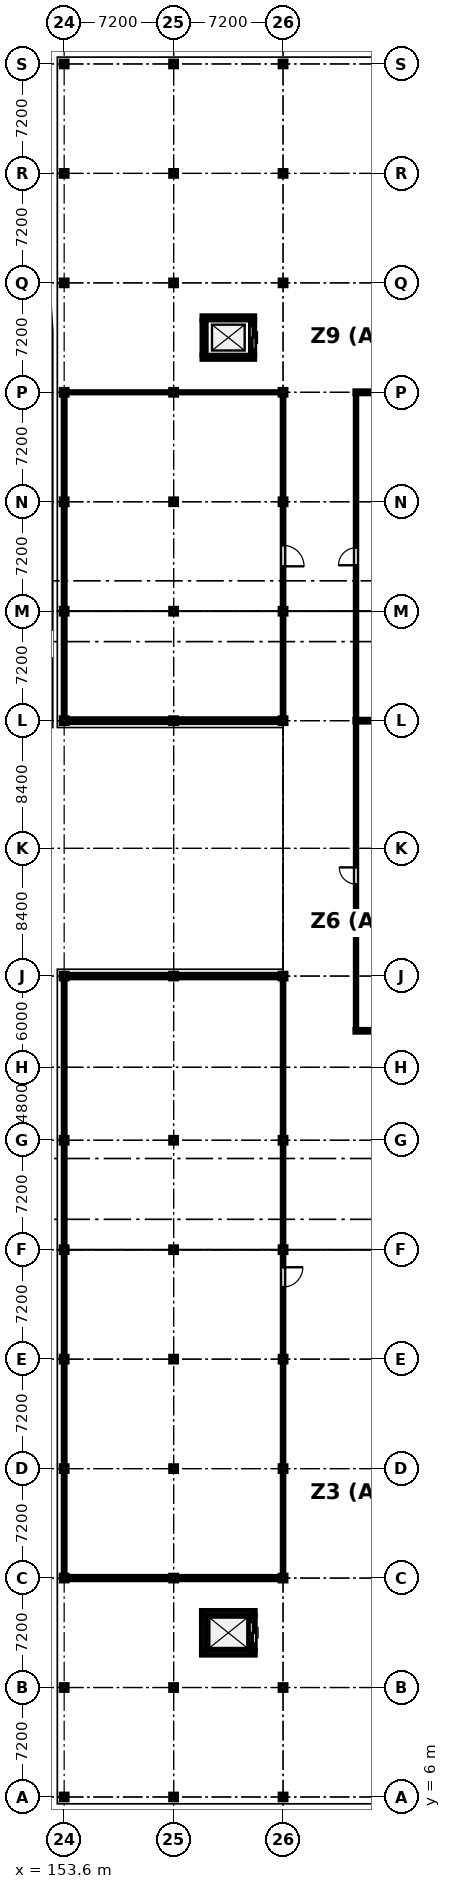
"""IFC4 building model, lengths in metres.
Left out: names, types, materials, properties, quantities, classifications, styles, units other than length and angle.
Written with IfcOpenShell. Run it as: python <this file> out.ifc"""

import sys

from ifc_helpers import new_model, si_unit, direction, frame, frame_2d, origin, origin_2d, place, context, subcontext, project, spatial, rectangle, i_section, extrude, element, fill, save


model = new_model("IFC4")
c1 = context("Model", 3, precision=1e-05, world=origin(), true_north=direction((0.0, 1.0)))
c2 = subcontext(c1, "Body", "Model", "MODEL_VIEW")
j1 = project(units=[si_unit("LENGTHUNIT", "METRE"), si_unit("PLANEANGLEUNIT", "RADIAN")], contexts=[c1])
p1 = place(None, origin())
s1 = spatial("IfcSite", under=j1, at=p1, CompositionType="ELEMENT")
p2 = place(p1, origin())
s2 = spatial("IfcBuilding", under=s1, at=p2, CompositionType="ELEMENT")
p3 = place(p2, frame((0.0, 0.0, -4.5)))
s3 = spatial("IfcBuildingStorey", under=s2, at=p3, CompositionType="ELEMENT", Elevation=-4.5)
for number, where, z_axis, x_axis in (
    (1, (153.6, 6.0, 0.0), (0.0, 0.0, 1.0), (1.0, 0.0, 0.0)),
    (2, (153.6, 13.2, 0.0), (0.0, 0.0, 1.0), (1.0, 0.0, 0.0)),
    (3, (153.6, 20.4, 0.0), (0.0, 0.0, 1.0), (1.0, 0.0, 0.0)),
    (4, (153.6, 27.6, 0.0), (0.0, 0.0, 1.0), (1.0, 0.0, 0.0)),
    (5, (153.6, 34.8, 0.0), (0.0, 0.0, 1.0), (1.0, 0.0, 0.0)),
    (6, (153.6, 42.0, 0.0), (0.0, 0.0, 1.0), (1.0, 0.0, 0.0)),
    (7, (153.6, 49.2, 0.0), (0.0, 0.0, 1.0), (1.0, 0.0, 0.0)),
    (8, (153.6, 60.0, 0.0), (0.0, 0.0, 1.0), (1.0, 0.0, 0.0)),
    (9, (153.6, 76.8, 0.0), (0.0, 0.0, 1.0), (1.0, 0.0, 0.0)),
    (10, (153.6, 84.0, 0.0), (0.0, 0.0, 1.0), (1.0, 0.0, 0.0)),
    (11, (153.6, 91.2, 0.0), (0.0, 0.0, 1.0), (1.0, 0.0, 0.0)),
    (12, (153.6, 98.4, 0.0), (0.0, 0.0, 1.0), (1.0, 0.0, 0.0)),
    (13, (153.6, 105.6, 0.0), (0.0, 0.0, 1.0), (1.0, 0.0, 0.0)),
    (14, (153.6, 112.8, 0.0), (0.0, 0.0, 1.0), (1.0, 0.0, 0.0)),
    (15, (153.6, 120.0, 0.0), (0.0, 0.0, 1.0), (1.0, 0.0, 0.0)),
    (16, (160.8, 6.0, 0.0), (0.0, 0.0, 1.0), (1.0, 0.0, 0.0)),
    (17, (160.8, 13.2, 0.0), (0.0, 0.0, 1.0), (1.0, 0.0, 0.0)),
    (18, (160.8, 20.4, 0.0), (0.0, 0.0, 1.0), (1.0, 0.0, 0.0)),
    (19, (160.8, 27.6, 0.0), (0.0, 0.0, 1.0), (1.0, 0.0, 0.0)),
    (20, (160.8, 34.8, 0.0), (0.0, 0.0, 1.0), (1.0, 0.0, 0.0)),
    (21, (160.8, 42.0, 0.0), (0.0, 0.0, 1.0), (1.0, 0.0, 0.0)),
    (22, (160.8, 49.2, 0.0), (0.0, 0.0, 1.0), (1.0, 0.0, 0.0)),
    (23, (160.8, 60.0, 0.0), (0.0, 0.0, 1.0), (1.0, 0.0, 0.0)),
    (24, (160.8, 76.8, 0.0), (0.0, 0.0, 1.0), (1.0, 0.0, 0.0)),
    (25, (160.8, 84.0, 0.0), (0.0, 0.0, 1.0), (1.0, 0.0, 0.0)),
    (26, (160.8, 91.2, 0.0), (0.0, 0.0, 1.0), (1.0, 0.0, 0.0)),
    (27, (160.8, 98.4, 0.0), (0.0, 0.0, 1.0), (1.0, 0.0, 0.0)),
    (28, (160.8, 105.6, 0.0), (0.0, 0.0, 1.0), (1.0, 0.0, 0.0)),
    (29, (160.8, 112.8, 0.0), (0.0, 0.0, 1.0), (1.0, 0.0, 0.0)),
    (30, (160.8, 120.0, 0.0), (0.0, 0.0, 1.0), (1.0, 0.0, 0.0)),
    (31, (168.0, 6.0, 0.0), (0.0, 0.0, 1.0), (1.0, 0.0, 0.0)),
    (32, (168.0, 13.2, 0.0), (0.0, 0.0, 1.0), (1.0, 0.0, 0.0)),
    (33, (168.0, 20.4, 0.0), (0.0, 0.0, 1.0), (1.0, 0.0, 0.0)),
    (34, (168.0, 27.6, 0.0), (0.0, 0.0, 1.0), (1.0, 0.0, 0.0)),
    (35, (168.0, 34.8, 0.0), (0.0, 0.0, 1.0), (1.0, 0.0, 0.0)),
    (36, (168.0, 42.0, 0.0), (0.0, 0.0, 1.0), (1.0, 0.0, 0.0)),
    (37, (168.0, 49.2, 0.0), (0.0, 0.0, 1.0), (1.0, 0.0, 0.0)),
    (38, (168.0, 60.0, 0.0), (0.0, 0.0, 1.0), (1.0, 0.0, 0.0)),
    (39, (168.0, 76.8, 0.0), (0.0, 0.0, 1.0), (1.0, 0.0, 0.0)),
    (40, (168.0, 84.0, 0.0), (0.0, 0.0, 1.0), (1.0, 0.0, 0.0)),
    (41, (168.0, 91.2, 0.0), (0.0, 0.0, 1.0), (1.0, 0.0, 0.0)),
    (42, (168.0, 98.4, 0.0), (0.0, 0.0, 1.0), (1.0, 0.0, 0.0)),
    (43, (168.0, 105.6, 0.0), (0.0, 0.0, 1.0), (1.0, 0.0, 0.0)),
    (44, (168.0, 112.8, 0.0), (0.0, 0.0, 1.0), (1.0, 0.0, 0.0)),
    (45, (168.0, 120.0, 0.0), (0.0, 0.0, 1.0), (1.0, 0.0, 0.0)),
):
    element("IfcColumn", number, at=place(p3, frame(where, z_axis=z_axis, x_axis=x_axis)), inside=s3, PredefinedType="COLUMN", context=c2, shape_type="SweptSolid", body=[
        extrude(i_section(OverallWidth=0.399, OverallDepth=0.394, WebThickness=0.023, FlangeThickness=0.037, FilletRadius=0.015, at=origin_2d()), origin(), (0.0, 0.0, 1.0), 4.5),
    ])
for number, where, z_axis, x_axis in (
    (46, (166.175, 15.488, 0.0), (0.0, 0.0, 1.0), (-1.0, 0.0, 0.0)),
    (47, (162.625, 18.112, 0.0), (0.0, 0.0, 1.0), (1.0, 0.0, 0.0)),
):
    element("IfcWall", number, at=place(p3, frame(where, z_axis=z_axis, x_axis=x_axis)), inside=s3, PredefinedType="SHEAR", context=c2, shape_type="SweptSolid", body=[
        extrude(rectangle(XDim=3.55, YDim=0.325, at=frame_2d((1.775, 0.0))), origin(), (0.0, 0.0, 1.0), 4.18),
    ])
p4 = place(p3, frame((162.788, 15.65, 0.0), z_axis=(0.0, 0.0, 1.0), x_axis=(0.0, 1.0, 0.0)))
e48 = element("IfcWall", 48, at=p4, inside=s3, PredefinedType="SHEAR", context=c2, shape_type="SweptSolid", body=[
    extrude(rectangle(XDim=2.3, YDim=0.325, at=frame_2d((1.15, 0.0))), origin(), (0.0, 0.0, 1.0), 4.18),
])
p5 = place(p3, frame((166.012, 17.95, 0.0), z_axis=(0.0, 0.0, 1.0), x_axis=(0.0, -1.0, 0.0)))
e49 = element("IfcWall", 49, at=p5, inside=s3, PredefinedType="SHEAR", context=c2, shape_type="SweptSolid", body=[
    extrude(rectangle(XDim=2.3, YDim=0.325, at=frame_2d((1.15, 0.0))), origin(), (0.0, 0.0, 1.0), 4.18),
])
p6 = place(p5, frame((0.45, 0.0, 0.0)))
e50 = element("IfcOpeningElement", 50, at=p6, cuts=e49, PredefinedType="OPENING", context=c2, shape_type="SweptSolid", body=[
    extrude(rectangle(XDim=1.4, YDim=2.3, at=frame_2d((0.7, 1.15))), frame((0.0, 0.172, 0.0), z_axis=(0.0, -1.0, 0.0), x_axis=(1.0, 0.0, 0.0)), (0.0, 0.0, 1.0), 0.345),
])
for number, where, z_axis, x_axis in (
    (51, (166.14, 100.705, 0.0), (0.0, 0.0, 1.0), (-1.0, 0.0, 0.0)),
    (52, (162.66, 103.295, 0.0), (0.0, 0.0, 1.0), (1.0, 0.0, 0.0)),
):
    element("IfcWall", number, at=place(p3, frame(where, z_axis=z_axis, x_axis=x_axis)), inside=s3, PredefinedType="SHEAR", context=c2, shape_type="SweptSolid", body=[
        extrude(rectangle(XDim=3.48, YDim=0.29, at=frame_2d((1.74, 0.0))), origin(), (0.0, 0.0, 1.0), 4.18),
    ])
p7 = place(p3, frame((162.805, 100.85, 0.0), z_axis=(0.0, 0.0, 1.0), x_axis=(0.0, 1.0, 0.0)))
e53 = element("IfcWall", 53, at=p7, inside=s3, PredefinedType="SHEAR", context=c2, shape_type="SweptSolid", body=[
    extrude(rectangle(XDim=2.3, YDim=0.29, at=frame_2d((1.15, 0.0))), origin(), (0.0, 0.0, 1.0), 4.18),
])
p8 = place(p3, frame((165.995, 103.15, 0.0), z_axis=(0.0, 0.0, 1.0), x_axis=(0.0, -1.0, 0.0)))
e54 = element("IfcWall", 54, at=p8, inside=s3, PredefinedType="SHEAR", context=c2, shape_type="SweptSolid", body=[
    extrude(rectangle(XDim=2.3, YDim=0.29, at=frame_2d((1.15, 0.0))), origin(), (0.0, 0.0, 1.0), 4.18),
])
p9 = place(p8, frame((0.4, 0.0, 0.0)))
e55 = element("IfcOpeningElement", 55, at=p9, cuts=e54, PredefinedType="OPENING", context=c2, shape_type="SweptSolid", body=[
    extrude(rectangle(XDim=1.5, YDim=2.3, at=frame_2d((0.75, 1.15))), frame((0.0, 0.155, 0.0), z_axis=(0.0, -1.0, 0.0), x_axis=(1.0, 0.0, 0.0)), (0.0, 0.0, 1.0), 0.31),
])
p10 = place(p3, frame((203.868, 56.4, 0.0), z_axis=(0.0, 0.0, 1.0), x_axis=(-1.0, 0.0, 0.0)))
e56 = element("IfcWall", 56, at=p10, inside=s3, PredefinedType="PARTITIONING", context=c2, shape_type="SweptSolid", body=[
    extrude(rectangle(XDim=31.148, YDim=0.198, at=frame_2d((15.574, 0.0))), origin(), (0.0, 0.0, 1.0), 3.403),
])
p11 = place(p3, frame((172.72, 76.8, 0.0), z_axis=(0.0, 0.0, 1.0), x_axis=(1.0, 0.0, 0.0)))
e57 = element("IfcWall", 57, at=p11, inside=s3, PredefinedType="PARTITIONING", context=c2, shape_type="SweptSolid", body=[
    extrude(rectangle(XDim=31.148, YDim=0.205, at=frame_2d((15.574, 0.0))), origin(), (0.0, 0.0, 1.0), 3.403),
])
p12 = place(p3, frame((172.72, 98.4, 0.0), z_axis=(0.0, 0.0, 1.0), x_axis=(1.0, 0.0, 0.0)))
e58 = element("IfcWall", 58, at=p12, inside=s3, PredefinedType="PARTITIONING", context=c2, shape_type="SweptSolid", body=[
    extrude(rectangle(XDim=31.148, YDim=0.212, at=frame_2d((15.574, 0.0))), origin(), (0.0, 0.0, 1.0), 3.403),
])
p13 = place(p3, frame((168.08, 20.4, 0.0), z_axis=(0.0, 0.0, 1.0), x_axis=(-1.0, 0.0, 0.0)))
e59 = element("IfcWall", 59, at=p13, inside=s3, PredefinedType="PARTITIONING", context=c2, shape_type="SweptSolid", body=[
    extrude(rectangle(XDim=14.56, YDim=0.235, at=frame_2d((7.28, 0.0))), origin(), (0.0, 0.0, 1.0), 3.403),
])
p14 = place(p3, frame((153.52, 60.0, 0.0), z_axis=(0.0, 0.0, 1.0), x_axis=(1.0, 0.0, 0.0)))
e60 = element("IfcWall", 60, at=p14, inside=s3, PredefinedType="PARTITIONING", context=c2, shape_type="SweptSolid", body=[
    extrude(rectangle(XDim=14.56, YDim=0.25, at=frame_2d((7.28, 0.0))), origin(), (0.0, 0.0, 1.0), 3.403),
])
p15 = place(p3, frame((168.08, 76.8, 0.0), z_axis=(0.0, 0.0, 1.0), x_axis=(-1.0, 0.0, 0.0)))
e61 = element("IfcWall", 61, at=p15, inside=s3, PredefinedType="PARTITIONING", context=c2, shape_type="SweptSolid", body=[
    extrude(rectangle(XDim=14.56, YDim=0.27, at=frame_2d((7.28, 0.0))), origin(), (0.0, 0.0, 1.0), 3.403),
])
p16 = place(p3, frame((153.52, 98.4, 0.0), z_axis=(0.0, 0.0, 1.0), x_axis=(1.0, 0.0, 0.0)))
e62 = element("IfcWall", 62, at=p16, inside=s3, PredefinedType="PARTITIONING", context=c2, shape_type="SweptSolid", body=[
    extrude(rectangle(XDim=14.56, YDim=0.095, at=frame_2d((7.28, 0.0))), origin(), (0.0, 0.0, 1.0), 3.403),
])
p17 = place(p3, frame((172.8, 56.501, 0.0), z_axis=(0.0, 0.0, 1.0), x_axis=(0.0, 1.0, 0.0)))
e63 = element("IfcWall", 63, at=p17, inside=s3, PredefinedType="PARTITIONING", context=c2, shape_type="SweptSolid", body=[
    extrude(rectangle(XDim=20.195, YDim=0.105, at=frame_2d((10.098, 0.0))), origin(), (0.0, 0.0, 1.0), 3.403),
])
p18 = place(p17, frame((9.548, 0.0, 0.0)))
e64 = element("IfcOpeningElement", 64, at=p18, cuts=e63, PredefinedType="OPENING", context=c2, shape_type="SweptSolid", body=[
    extrude(rectangle(XDim=1.1, YDim=2.1, at=frame_2d((0.55, 1.05))), frame((0.0, 0.062, 0.0), z_axis=(0.0, -1.0, 0.0), x_axis=(1.0, 0.0, 0.0)), (0.0, 0.0, 1.0), 0.125),
])
p19 = place(p3, frame((172.8, 76.904, 0.0), z_axis=(0.0, 0.0, 1.0), x_axis=(0.0, 1.0, 0.0)))
e65 = element("IfcWall", 65, at=p19, inside=s3, PredefinedType="PARTITIONING", context=c2, shape_type="SweptSolid", body=[
    extrude(rectangle(XDim=21.388, YDim=0.11, at=frame_2d((10.694, 0.0))), origin(), (0.0, 0.0, 1.0), 3.403),
])
p20 = place(p19, frame((10.119, 0.0, 0.0)))
e66 = element("IfcOpeningElement", 66, at=p20, cuts=e65, PredefinedType="OPENING", context=c2, shape_type="SweptSolid", body=[
    extrude(rectangle(XDim=1.15, YDim=2.1, at=frame_2d((0.575, 1.05))), frame((0.0, 0.065, 0.0), z_axis=(0.0, -1.0, 0.0), x_axis=(1.0, 0.0, 0.0)), (0.0, 0.0, 1.0), 0.13),
])
p21 = place(p3, frame((168.0, 59.873, 0.0), z_axis=(0.0, 0.0, 1.0), x_axis=(0.0, -1.0, 0.0)))
e67 = element("IfcWall", 67, at=p21, inside=s3, PredefinedType="PARTITIONING", context=c2, shape_type="SweptSolid", body=[
    extrude(rectangle(XDim=39.354, YDim=0.12, at=frame_2d((19.677, 0.0))), origin(), (0.0, 0.0, 1.0), 3.403),
])
p22 = place(p21, frame((19.027, 0.0, 0.0)))
e68 = element("IfcOpeningElement", 68, at=p22, cuts=e67, PredefinedType="OPENING", context=c2, shape_type="SweptSolid", body=[
    extrude(rectangle(XDim=1.3, YDim=2.1, at=frame_2d((0.65, 1.05))), frame((0.0, 0.07, 0.0), z_axis=(0.0, -1.0, 0.0), x_axis=(1.0, 0.0, 0.0)), (0.0, 0.0, 1.0), 0.14),
])
p23 = place(p3, frame((168.0, 98.351, 0.0), z_axis=(0.0, 0.0, 1.0), x_axis=(0.0, -1.0, 0.0)))
e69 = element("IfcWall", 69, at=p23, inside=s3, PredefinedType="PARTITIONING", context=c2, shape_type="SweptSolid", body=[
    extrude(rectangle(XDim=21.414, YDim=0.125, at=frame_2d((10.707, 0.0))), origin(), (0.0, 0.0, 1.0), 3.403),
])
p24 = place(p23, frame((10.017, 0.0, 0.0)))
e70 = element("IfcOpeningElement", 70, at=p24, cuts=e69, PredefinedType="OPENING", context=c2, shape_type="SweptSolid", body=[
    extrude(rectangle(XDim=1.38, YDim=2.1, at=frame_2d((0.69, 1.05))), frame((0.0, 0.073, 0.0), z_axis=(0.0, -1.0, 0.0), x_axis=(1.0, 0.0, 0.0)), (0.0, 0.0, 1.0), 0.145),
])
p25 = place(p3, frame((153.6, 20.519, 0.0), z_axis=(0.0, 0.0, 1.0), x_axis=(0.0, 1.0, 0.0)))
e71 = element("IfcWall", 71, at=p25, inside=s3, PredefinedType="PARTITIONING", context=c2, shape_type="SweptSolid", body=[
    extrude(rectangle(XDim=39.354, YDim=0.14, at=frame_2d((19.677, 0.0))), origin(), (0.0, 0.0, 1.0), 3.403),
])
p26 = place(p3, frame((153.6, 76.937, 0.0), z_axis=(0.0, 0.0, 1.0), x_axis=(0.0, 1.0, 0.0)))
e72 = element("IfcWall", 72, at=p26, inside=s3, PredefinedType="PARTITIONING", context=c2, shape_type="SweptSolid", body=[
    extrude(rectangle(XDim=21.414, YDim=0.145, at=frame_2d((10.707, 0.0))), origin(), (0.0, 0.0, 1.0), 3.403),
])
p27 = place(p6, origin())
e73 = element("IfcDoor", 73, at=p27, inside=s3, OperationType="DOUBLE_DOOR_SLIDING", PredefinedType="DOOR", context=c2, shape_type="SweptSolid", body=[
    extrude(rectangle(XDim=1.4, YDim=2.3, at=frame_2d((0.7, 1.15))), frame((0.0, 0.025, 0.0), z_axis=(0.0, -1.0, 0.0), x_axis=(1.0, 0.0, 0.0)), (0.0, 0.0, 1.0), 0.05),
])
fill(e50, e73)
p28 = place(p9, origin())
e74 = element("IfcDoor", 74, at=p28, inside=s3, OperationType="DOUBLE_DOOR_SLIDING", PredefinedType="DOOR", context=c2, shape_type="SweptSolid", body=[
    extrude(rectangle(XDim=1.5, YDim=2.3, at=frame_2d((0.75, 1.15))), frame((0.0, 0.025, 0.0), z_axis=(0.0, -1.0, 0.0), x_axis=(1.0, 0.0, 0.0)), (0.0, 0.0, 1.0), 0.05),
])
fill(e55, e74)
p29 = place(p18, origin())
e75 = element("IfcDoor", 75, at=p29, inside=s3, OperationType="SINGLE_SWING_RIGHT", PredefinedType="DOOR", context=c2, shape_type="SweptSolid", body=[
    extrude(rectangle(XDim=1.1, YDim=2.1, at=frame_2d((0.55, 1.05))), frame((0.0, 0.025, 0.0), z_axis=(0.0, -1.0, 0.0), x_axis=(1.0, 0.0, 0.0)), (0.0, 0.0, 1.0), 0.05),
])
fill(e64, e75)
p30 = place(p20, origin())
e76 = element("IfcDoor", 76, at=p30, inside=s3, OperationType="SINGLE_SWING_LEFT", PredefinedType="DOOR", context=c2, shape_type="SweptSolid", body=[
    extrude(rectangle(XDim=1.15, YDim=2.1, at=frame_2d((0.575, 1.05))), frame((0.0, 0.025, 0.0), z_axis=(0.0, -1.0, 0.0), x_axis=(1.0, 0.0, 0.0)), (0.0, 0.0, 1.0), 0.05),
])
fill(e66, e76)
p31 = place(p22, origin())
e77 = element("IfcDoor", 77, at=p31, inside=s3, OperationType="SINGLE_SWING_LEFT", PredefinedType="DOOR", context=c2, shape_type="SweptSolid", body=[
    extrude(rectangle(XDim=1.3, YDim=2.1, at=frame_2d((0.65, 1.05))), frame((0.0, 0.025, 0.0), z_axis=(0.0, -1.0, 0.0), x_axis=(1.0, 0.0, 0.0)), (0.0, 0.0, 1.0), 0.05),
])
fill(e68, e77)
p32 = place(p24, origin())
e78 = element("IfcDoor", 78, at=p32, inside=s3, OperationType="SINGLE_SWING_RIGHT", PredefinedType="DOOR", context=c2, shape_type="SweptSolid", body=[
    extrude(rectangle(XDim=1.38, YDim=2.1, at=frame_2d((0.69, 1.05))), frame((0.0, 0.025, 0.0), z_axis=(0.0, -1.0, 0.0), x_axis=(1.0, 0.0, 0.0)), (0.0, 0.0, 1.0), 0.05),
])
fill(e70, e78)
save(model, sys.argv[1])
